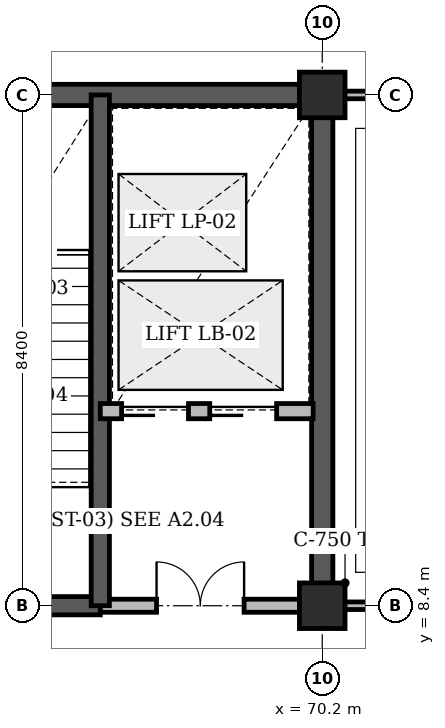
"""IFC4 building model, lengths in metres.
Left out: names, types, materials, properties, quantities, classifications, styles, units other than length and angle.
Written with IfcOpenShell. Run it as: python <this file> out.ifc"""

import sys

from ifc_helpers import new_model, si_unit, direction, frame, frame_2d, origin, origin_2d, place, context, subcontext, project, spatial, rectangle, extrude, element, fill, save


model = new_model("IFC4")
c1 = context("Model", 3, precision=1e-05, world=origin(), true_north=direction((0.0, 1.0)))
c2 = subcontext(c1, "Body", "Model", "MODEL_VIEW")
j1 = project(units=[si_unit("LENGTHUNIT", "METRE"), si_unit("PLANEANGLEUNIT", "RADIAN")], contexts=[c1])
p1 = place(None, origin())
s1 = spatial("IfcSite", under=j1, at=p1, CompositionType="ELEMENT")
p2 = place(p1, origin())
s2 = spatial("IfcBuilding", under=s1, at=p2, CompositionType="ELEMENT")
p3 = place(p2, frame((0.0, 0.0, 4.8)))
s3 = spatial("IfcBuildingStorey", under=s2, at=p3, CompositionType="ELEMENT", Elevation=4.8)
p4 = place(p3, frame((62.225, 16.8, 0.0), z_axis=(0.0, 0.0, 1.0), x_axis=(1.0, 0.0, 0.0)))
e1 = element("IfcWall", 1, at=p4, inside=s3, PredefinedType="SHEAR", context=c2, shape_type="SweptSolid", body=[
    extrude(rectangle(XDim=8.15, YDim=0.35, at=frame_2d((4.075, 0.0))), origin(), (0.0, 0.0, 1.0), 4.48),
])
p5 = place(p3, frame((70.2, 8.4, 0.0), z_axis=(0.0, 0.0, 1.0), x_axis=(0.0, 1.0, 0.0)))
e2 = element("IfcWall", 2, at=p5, inside=s3, PredefinedType="SHEAR", context=c2, shape_type="SweptSolid", body=[
    extrude(rectangle(XDim=8.4, YDim=0.35, at=frame_2d((4.2, 0.0))), origin(), (0.0, 0.0, 1.0), 4.48),
])
for number, where, z_axis, x_axis in (
    (3, (70.2, 8.4, 0.0), (0.0, 0.0, 1.0), (1.0, 0.0, 0.0)),
    (4, (70.2, 16.8, 0.0), (0.0, 0.0, 1.0), (1.0, 0.0, 0.0)),
):
    element("IfcColumn", number, at=place(p3, frame(where, z_axis=z_axis, x_axis=x_axis)), inside=s3, PredefinedType="COLUMN", context=c2, shape_type="SweptSolid", body=[
        extrude(rectangle(XDim=0.75, YDim=0.75, at=origin_2d()), origin(), (0.0, 0.0, 1.0), 4.8),
    ])
p6 = place(p3, frame((62.4, 8.4, 0.0), z_axis=(0.0, 0.0, 1.0), x_axis=(1.0, 0.0, 0.0)))
e5 = element("IfcWall", 5, at=p6, inside=s3, PredefinedType="SHEAR", context=c2, shape_type="SweptSolid", body=[
    extrude(rectangle(XDim=4.15, YDim=0.3, at=frame_2d((2.075, 0.0))), origin(), (0.0, 0.0, 1.0), 4.8),
])
p7 = place(p6, frame((1.515, 0.0, 0.0)))
e6 = element("IfcOpeningElement", 6, at=p7, cuts=e5, PredefinedType="OPENING", context=c2, shape_type="SweptSolid", body=[
    extrude(rectangle(XDim=1.12, YDim=2.15, at=frame_2d((0.56, 1.075))), frame((0.0, 0.16, 0.0), z_axis=(0.0, -1.0, 0.0), x_axis=(1.0, 0.0, 0.0)), (0.0, 0.0, 1.0), 0.32),
])
p8 = place(p3, frame((66.55, 8.4, 0.0), z_axis=(0.0, 0.0, 1.0), x_axis=(1.0, 0.0, 0.0)))
e7 = element("IfcWall", 7, at=p8, inside=s3, PredefinedType="STANDARD", context=c2, shape_type="SweptSolid", body=[
    extrude(rectangle(XDim=3.29, YDim=0.215, at=frame_2d((1.645, 0.0))), origin(), (0.0, 0.0, 1.0), 3.68),
])
p9 = place(p8, frame((0.925, 0.0, 0.0)))
e8 = element("IfcOpeningElement", 8, at=p9, cuts=e7, PredefinedType="OPENING", context=c2, shape_type="SweptSolid", body=[
    extrude(rectangle(XDim=1.44, YDim=2.2, at=frame_2d((0.72, 1.1))), frame((0.0, 0.118, 0.0), z_axis=(0.0, -1.0, 0.0), x_axis=(1.0, 0.0, 0.0)), (0.0, 0.0, 1.0), 0.235),
])
p10 = place(p3, frame((66.55, 8.4, 0.0), z_axis=(0.0, 0.0, 1.0), x_axis=(0.0, 1.0, 0.0)))
e9 = element("IfcWall", 9, at=p10, inside=s3, PredefinedType="SHEAR", context=c2, shape_type="SweptSolid", body=[
    extrude(rectangle(XDim=8.4, YDim=0.3, at=frame_2d((4.2, 0.0))), origin(), (0.0, 0.0, 1.0), 4.8),
])
p11 = place(p3, frame((66.55, 11.6, 0.0), z_axis=(0.0, 0.0, 1.0), x_axis=(1.0, 0.0, 0.0)))
e10 = element("IfcWall", 10, at=p11, inside=s3, PredefinedType="STANDARD", context=c2, shape_type="SweptSolid", body=[
    extrude(rectangle(XDim=3.5, YDim=0.25, at=frame_2d((1.75, 0.0))), origin(), (0.0, 0.0, 1.0), 4.46),
])
p12 = place(p11, frame((0.35, 0.0, 0.0)))
e11 = element("IfcOpeningElement", 11, at=p12, cuts=e10, PredefinedType="OPENING", context=c2, shape_type="SweptSolid", body=[
    extrude(rectangle(XDim=1.1, YDim=2.2, at=frame_2d((0.55, 1.1))), frame((0.0, 0.135, 0.0), z_axis=(0.0, -1.0, 0.0), x_axis=(1.0, 0.0, 0.0)), (0.0, 0.0, 1.0), 0.27),
])
p13 = place(p11, frame((1.8, 0.0, 0.0)))
e12 = element("IfcOpeningElement", 12, at=p13, cuts=e10, PredefinedType="OPENING", context=c2, shape_type="SweptSolid", body=[
    extrude(rectangle(XDim=1.1, YDim=2.2, at=frame_2d((0.55, 1.1))), frame((0.0, 0.135, 0.0), z_axis=(0.0, -1.0, 0.0), x_axis=(1.0, 0.0, 0.0)), (0.0, 0.0, 1.0), 0.27),
])
p14 = place(p3, frame((70.56, 8.4, 0.0), z_axis=(0.0, 0.0, 1.0), x_axis=(1.0, 0.0, 0.0)))
e13 = element("IfcWall", 13, at=p14, inside=s3, PredefinedType="PARTITIONING", context=c2, shape_type="SweptSolid", body=[
    extrude(rectangle(XDim=7.08, YDim=0.125, at=frame_2d((3.54, 0.0))), origin(), (0.0, 0.0, 1.0), 3.68),
])
p15 = place(p14, frame((3.04, 0.0, 0.0)))
e14 = element("IfcOpeningElement", 14, at=p15, cuts=e13, PredefinedType="OPENING", context=c2, shape_type="SweptSolid", body=[
    extrude(rectangle(XDim=1.0, YDim=2.1, at=frame_2d((0.5, 1.05))), frame((0.0, 0.073, 0.0), z_axis=(0.0, -1.0, 0.0), x_axis=(1.0, 0.0, 0.0)), (0.0, 0.0, 1.0), 0.145),
])
p16 = place(p3, frame((70.56, 16.8, 0.0), z_axis=(0.0, 0.0, 1.0), x_axis=(1.0, 0.0, 0.0)))
e15 = element("IfcWall", 15, at=p16, inside=s3, PredefinedType="PARTITIONING", context=c2, shape_type="SweptSolid", body=[
    extrude(rectangle(XDim=7.08, YDim=0.125, at=frame_2d((3.54, 0.0))), origin(), (0.0, 0.0, 1.0), 3.68),
])
p17 = place(p9, origin())
e16 = element("IfcDoor", 16, at=p17, inside=s3, OperationType="DOUBLE_DOOR_SINGLE_SWING", PredefinedType="DOOR", context=c2, shape_type="SweptSolid", body=[
    extrude(rectangle(XDim=1.44, YDim=2.2, at=frame_2d((0.72, 1.1))), frame((0.0, 0.025, 0.0), z_axis=(0.0, -1.0, 0.0), x_axis=(1.0, 0.0, 0.0)), (0.0, 0.0, 1.0), 0.05),
])
fill(e8, e16)
p18 = place(p12, origin())
e17 = element("IfcDoor", 17, at=p18, inside=s3, OperationType="SLIDING_TO_LEFT", PredefinedType="DOOR", context=c2, shape_type="SweptSolid", body=[
    extrude(rectangle(XDim=1.1, YDim=2.2, at=frame_2d((0.55, 1.1))), frame((0.0, 0.025, 0.0), z_axis=(0.0, -1.0, 0.0), x_axis=(1.0, 0.0, 0.0)), (0.0, 0.0, 1.0), 0.05),
])
fill(e11, e17)
p19 = place(p13, origin())
e18 = element("IfcDoor", 18, at=p19, inside=s3, OperationType="SLIDING_TO_LEFT", PredefinedType="DOOR", context=c2, shape_type="SweptSolid", body=[
    extrude(rectangle(XDim=1.1, YDim=2.2, at=frame_2d((0.55, 1.1))), frame((0.0, 0.025, 0.0), z_axis=(0.0, -1.0, 0.0), x_axis=(1.0, 0.0, 0.0)), (0.0, 0.0, 1.0), 0.05),
])
fill(e12, e18)
save(model, sys.argv[1])
